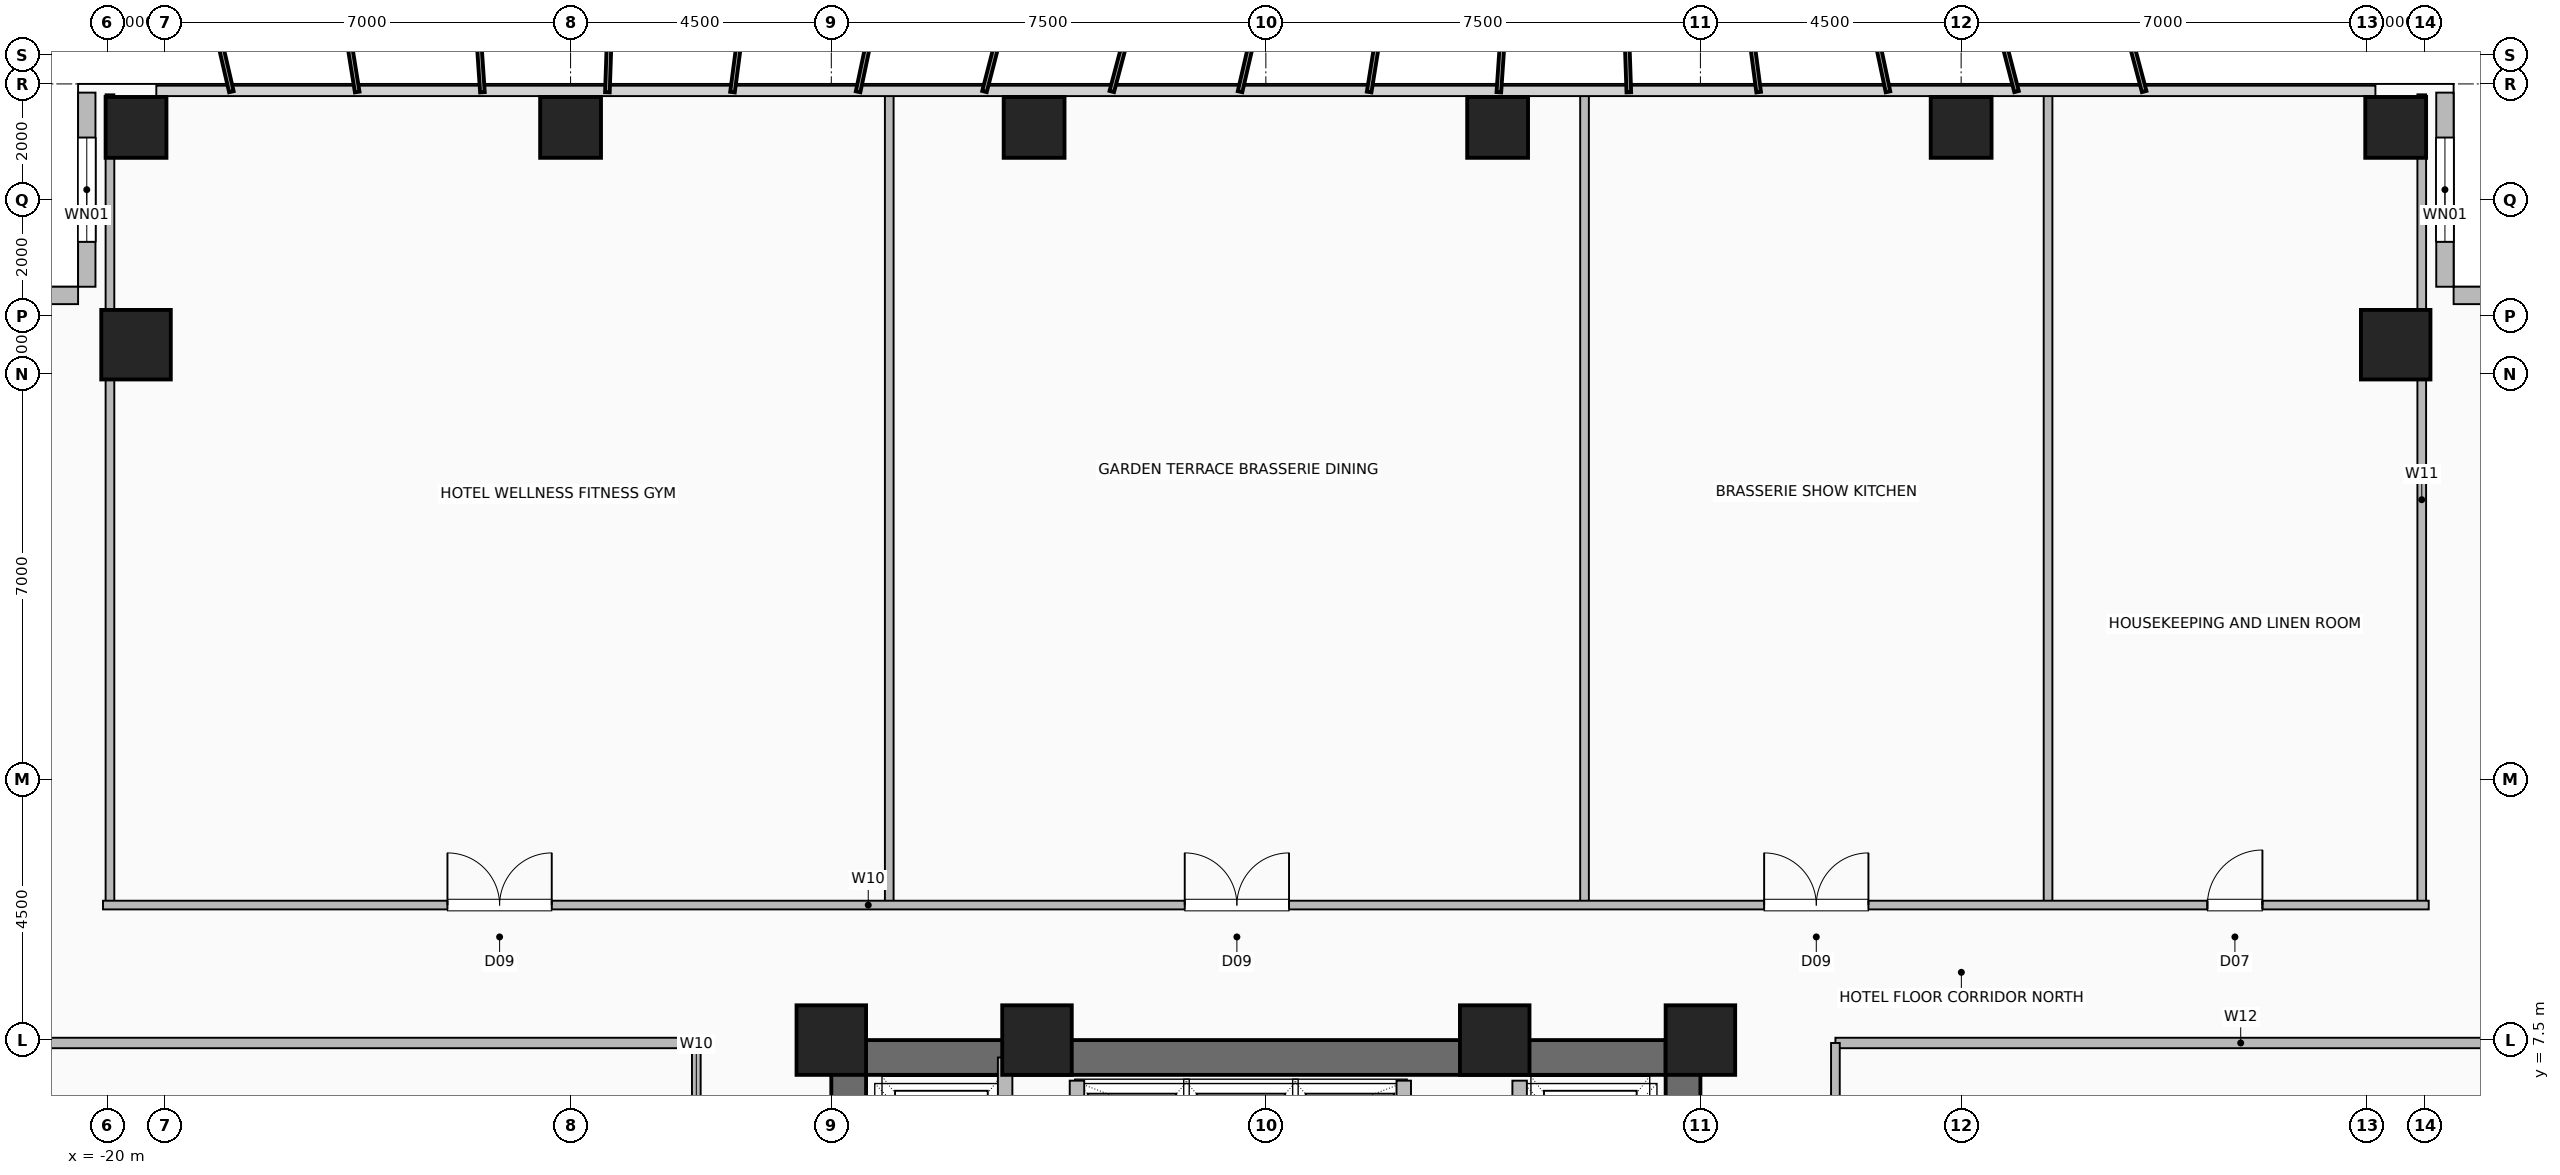
"""IFC4 building model, lengths in metres.
Left out: names, types, materials, properties, quantities, classifications, styles, units other than length and angle.
Written with IfcOpenShell. Run it as: python <this file> out.ifc"""

import sys

from ifc_helpers import new_model, si_unit, direction, frame, frame_2d, origin, origin_2d, place, context, subcontext, project, spatial, rectangle, hollow_rectangle, extrude, element, fill, save


model = new_model("IFC4")
c1 = context("Model", 3, precision=1e-05, world=origin(), true_north=direction((0.0, 1.0)))
c2 = subcontext(c1, "Body", "Model", "MODEL_VIEW")
j1 = project(units=[si_unit("LENGTHUNIT", "METRE"), si_unit("PLANEANGLEUNIT", "RADIAN")], contexts=[c1])
p1 = place(None, origin())
s1 = spatial("IfcSite", under=j1, at=p1, CompositionType="ELEMENT")
p2 = place(p1, origin())
s2 = spatial("IfcBuilding", under=s1, at=p2, CompositionType="ELEMENT")
p3 = place(p2, frame((0.0, 0.0, 48.0)))
s3 = spatial("IfcBuildingStorey", under=s2, at=p3, CompositionType="ELEMENT", Elevation=48.0)
for number, where, z_axis, x_axis in (
    (1, (7.5, 7.5, 0.0), (0.0, 0.0, 1.0), (1.0, 0.0, 0.0)),
    (2, (3.95, 7.5, 0.0), (0.0, 0.0, 1.0), (1.0, 0.0, 0.0)),
    (3, (-3.95, 7.5, 0.0), (0.0, 0.0, 1.0), (1.0, 0.0, 0.0)),
    (4, (-7.5, 7.5, 0.0), (0.0, 0.0, 1.0), (1.0, 0.0, 0.0)),
):
    element("IfcColumn", number, at=place(p3, frame(where, z_axis=z_axis, x_axis=x_axis)), inside=s3, PredefinedType="COLUMN", context=c2, shape_type="SweptSolid", body=[
        extrude(hollow_rectangle(XDim=1.2, YDim=1.2, WallThickness=0.055, at=origin_2d()), origin(), (0.0, 0.0, 1.0), 3.5),
    ])
for number, where, z_axis, x_axis in (
    (5, (-19.5, 23.25, 0.0), (0.0, 0.0, 1.0), (1.0, 0.0, 0.0)),
    (6, (-12.0, 23.25, 0.0), (0.0, 0.0, 1.0), (1.0, 0.0, 0.0)),
    (7, (-4.0, 23.25, 0.0), (0.0, 0.0, 1.0), (1.0, 0.0, 0.0)),
    (8, (4.0, 23.25, 0.0), (0.0, 0.0, 1.0), (1.0, 0.0, 0.0)),
    (9, (12.0, 23.25, 0.0), (0.0, 0.0, 1.0), (1.0, 0.0, 0.0)),
    (10, (19.5, 23.25, 0.0), (0.0, 0.0, 1.0), (1.0, 0.0, 0.0)),
):
    element("IfcColumn", number, at=place(p3, frame(where, z_axis=z_axis, x_axis=x_axis)), inside=s3, PredefinedType="COLUMN", context=c2, shape_type="SweptSolid", body=[
        extrude(hollow_rectangle(XDim=1.05, YDim=1.05, WallThickness=0.05, at=origin_2d()), origin(), (0.0, 0.0, 1.0), 3.5),
    ])
for number, where, z_axis, x_axis in (
    (11, (19.5, 19.5, 0.0), (0.0, 0.0, 1.0), (1.0, 0.0, 0.0)),
    (12, (-19.5, 19.5, 0.0), (0.0, 0.0, 1.0), (1.0, 0.0, 0.0)),
):
    element("IfcColumn", number, at=place(p3, frame(where, z_axis=z_axis, x_axis=x_axis)), inside=s3, PredefinedType="COLUMN", context=c2, shape_type="SweptSolid", body=[
        extrude(hollow_rectangle(XDim=1.2, YDim=1.2, WallThickness=0.055, at=origin_2d()), origin(), (0.0, 0.0, 1.0), 3.5),
    ])
p4 = place(p3, frame((20.35, 23.85, 0.0), z_axis=(0.0, 0.0, 1.0), x_axis=(0.0, -1.0, 0.0)))
e13 = element("IfcWall", 13, at=p4, inside=s3, PredefinedType="SOLIDWALL", context=c2, shape_type="SweptSolid", body=[
    extrude(rectangle(XDim=3.35, YDim=0.3, at=frame_2d((1.675, 0.0))), origin(), (0.0, 0.0, 1.0), 3.25),
])
p5 = place(p4, frame((0.775, 0.0, 0.9)))
e14 = element("IfcOpeningElement", 14, at=p5, cuts=e13, PredefinedType="OPENING", context=c2, shape_type="SweptSolid", body=[
    extrude(rectangle(XDim=1.8, YDim=1.8, at=frame_2d((0.9, 0.9))), frame((0.0, 0.16, 0.0), z_axis=(0.0, -1.0, 0.0), x_axis=(1.0, 0.0, 0.0)), (0.0, 0.0, 1.0), 0.32),
])
p6 = place(p3, frame((23.85, 20.35, 0.0), z_axis=(0.0, 0.0, 1.0), x_axis=(-1.0, 0.0, 0.0)))
e15 = element("IfcWall", 15, at=p6, inside=s3, PredefinedType="SOLIDWALL", context=c2, shape_type="SweptSolid", body=[
    extrude(rectangle(XDim=3.35, YDim=0.3, at=frame_2d((1.675, 0.0))), origin(), (0.0, 0.0, 1.0), 3.25),
])
p7 = place(p3, frame((-20.35, 23.85, 0.0), z_axis=(0.0, 0.0, 1.0), x_axis=(0.0, -1.0, 0.0)))
e16 = element("IfcWall", 16, at=p7, inside=s3, PredefinedType="SOLIDWALL", context=c2, shape_type="SweptSolid", body=[
    extrude(rectangle(XDim=3.35, YDim=0.3, at=frame_2d((1.675, 0.0))), origin(), (0.0, 0.0, 1.0), 3.25),
])
p8 = place(p7, frame((0.775, 0.0, 0.9)))
e17 = element("IfcOpeningElement", 17, at=p8, cuts=e16, PredefinedType="OPENING", context=c2, shape_type="SweptSolid", body=[
    extrude(rectangle(XDim=1.8, YDim=1.8, at=frame_2d((0.9, 0.9))), frame((0.0, 0.16, 0.0), z_axis=(0.0, -1.0, 0.0), x_axis=(1.0, 0.0, 0.0)), (0.0, 0.0, 1.0), 0.32),
])
p9 = place(p3, frame((-23.85, 20.35, 0.0), z_axis=(0.0, 0.0, 1.0), x_axis=(1.0, 0.0, 0.0)))
e18 = element("IfcWall", 18, at=p9, inside=s3, PredefinedType="SOLIDWALL", context=c2, shape_type="SweptSolid", body=[
    extrude(rectangle(XDim=3.35, YDim=0.3, at=frame_2d((1.675, 0.0))), origin(), (0.0, 0.0, 1.0), 3.25),
])
p10 = place(p3, frame((-7.5, 7.2, 0.0), z_axis=(0.0, 0.0, 1.0), x_axis=(1.0, 0.0, 0.0)))
e19 = element("IfcWall", 19, at=p10, inside=s3, PredefinedType="SHEAR", context=c2, shape_type="SweptSolid", body=[
    extrude(rectangle(XDim=15.0, YDim=0.6, at=frame_2d((7.5, 0.0))), origin(), (0.0, 0.0, 1.0), 3.25),
])
p11 = place(p3, frame((-7.2, -7.5, 0.0), z_axis=(0.0, 0.0, 1.0), x_axis=(0.0, 1.0, 0.0)))
e20 = element("IfcWall", 20, at=p11, inside=s3, PredefinedType="SHEAR", context=c2, shape_type="SweptSolid", body=[
    extrude(rectangle(XDim=15.0, YDim=0.6, at=frame_2d((7.5, 0.0))), origin(), (0.0, 0.0, 1.0), 3.25),
])
p12 = place(p11, frame((9.5, 0.0, 0.0)))
e21 = element("IfcOpeningElement", 21, at=p12, cuts=e20, PredefinedType="OPENING", context=c2, shape_type="SweptSolid", body=[
    extrude(rectangle(XDim=1.0, YDim=2.08, at=frame_2d((0.5, 1.04))), frame((0.0, 0.31, 0.0), z_axis=(0.0, -1.0, 0.0), x_axis=(1.0, 0.0, 0.0)), (0.0, 0.0, 1.0), 0.62),
])
p13 = place(p3, frame((7.2, -7.5, 0.0), z_axis=(0.0, 0.0, 1.0), x_axis=(0.0, 1.0, 0.0)))
e22 = element("IfcWall", 22, at=p13, inside=s3, PredefinedType="SHEAR", context=c2, shape_type="SweptSolid", body=[
    extrude(rectangle(XDim=15.0, YDim=0.6, at=frame_2d((7.5, 0.0))), origin(), (0.0, 0.0, 1.0), 3.25),
])
for number, where, z_axis, x_axis in (
    (23, (-3.26, 4.58, 0.0), (0.0, 0.0, 1.0), (0.0, 1.0, 0.0)),
    (24, (2.38, 4.58, 0.0), (0.0, 0.0, 1.0), (0.0, 1.0, 0.0)),
):
    element("IfcWall", number, at=place(p3, frame(where, z_axis=z_axis, x_axis=x_axis)), inside=s3, PredefinedType="SHEAR", context=c2, shape_type="SweptSolid", body=[
        extrude(rectangle(XDim=2.22, YDim=0.25, at=frame_2d((1.11, 0.0))), origin(), (0.0, 0.0, 1.0), 3.25),
    ])
p14 = place(p3, frame((-4.5, 4.35, 0.0), z_axis=(0.0, 0.0, 1.0), x_axis=(0.0, 1.0, 0.0)))
e25 = element("IfcWall", 25, at=p14, inside=s3, PredefinedType="SHEAR", context=c2, shape_type="SweptSolid", body=[
    extrude(rectangle(XDim=2.85, YDim=0.25, at=frame_2d((1.425, 0.0))), origin(), (0.0, 0.0, 1.0), 3.25),
])
p15 = place(p3, frame((4.38, 4.3, 0.0), z_axis=(0.0, 0.0, 1.0), x_axis=(0.0, 1.0, 0.0)))
e26 = element("IfcWall", 26, at=p15, inside=s3, PredefinedType="SHEAR", context=c2, shape_type="SweptSolid", body=[
    extrude(rectangle(XDim=2.5, YDim=0.25, at=frame_2d((1.25, 0.0))), origin(), (0.0, 0.0, 1.0), 3.25),
])
p16 = place(p15, frame((0.8, 0.0, 0.0)))
e27 = element("IfcOpeningElement", 27, at=p16, cuts=e26, PredefinedType="OPENING", context=c2, shape_type="SweptSolid", body=[
    extrude(rectangle(XDim=1.2, YDim=2.2, at=frame_2d((0.6, 1.1))), frame((0.0, 0.135, 0.0), z_axis=(0.0, -1.0, 0.0), x_axis=(1.0, 0.0, 0.0)), (0.0, 0.0, 1.0), 0.27),
])
for number, where, z_axis, x_axis in (
    (28, (-19.95, 9.83, 0.0), (0.0, 0.0, 1.0), (0.0, 1.0, 0.0)),
    (29, (-6.5, 9.83, 0.0), (0.0, 0.0, 1.0), (0.0, 1.0, 0.0)),
    (30, (5.5, 9.83, 0.0), (0.0, 0.0, 1.0), (0.0, 1.0, 0.0)),
    (31, (13.5, 9.83, 0.0), (0.0, 0.0, 1.0), (0.0, 1.0, 0.0)),
    (32, (19.95, 9.83, 0.0), (0.0, 0.0, 1.0), (0.0, 1.0, 0.0)),
):
    element("IfcWall", number, at=place(p3, frame(where, z_axis=z_axis, x_axis=x_axis)), inside=s3, PredefinedType="PARTITIONING", context=c2, shape_type="SweptSolid", body=[
        extrude(rectangle(XDim=13.99, YDim=0.15, at=frame_2d((6.995, 0.0))), origin(), (0.0, 0.0, 1.0), 3.25),
    ])
p17 = place(p3, frame((-20.07, 9.83, 0.0), z_axis=(0.0, 0.0, 1.0), x_axis=(1.0, 0.0, 0.0)))
e33 = element("IfcWall", 33, at=p17, inside=s3, PredefinedType="PARTITIONING", context=c2, shape_type="SweptSolid", body=[
    extrude(rectangle(XDim=40.14, YDim=0.15, at=frame_2d((20.07, 0.0))), origin(), (0.0, 0.0, 1.0), 3.25),
])
p18 = place(p17, frame((5.945, 0.0, 0.0)))
e34 = element("IfcOpeningElement", 34, at=p18, cuts=e33, PredefinedType="OPENING", context=c2, shape_type="SweptSolid", body=[
    extrude(rectangle(XDim=1.8, YDim=2.08, at=frame_2d((0.9, 1.04))), frame((0.0, 0.085, 0.0), z_axis=(0.0, -1.0, 0.0), x_axis=(1.0, 0.0, 0.0)), (0.0, 0.0, 1.0), 0.17),
])
p19 = place(p17, frame((18.67, 0.0, 0.0)))
e35 = element("IfcOpeningElement", 35, at=p19, cuts=e33, PredefinedType="OPENING", context=c2, shape_type="SweptSolid", body=[
    extrude(rectangle(XDim=1.8, YDim=2.08, at=frame_2d((0.9, 1.04))), frame((0.0, 0.085, 0.0), z_axis=(0.0, -1.0, 0.0), x_axis=(1.0, 0.0, 0.0)), (0.0, 0.0, 1.0), 0.17),
])
p20 = place(p17, frame((28.67, 0.0, 0.0)))
e36 = element("IfcOpeningElement", 36, at=p20, cuts=e33, PredefinedType="OPENING", context=c2, shape_type="SweptSolid", body=[
    extrude(rectangle(XDim=1.8, YDim=2.08, at=frame_2d((0.9, 1.04))), frame((0.0, 0.085, 0.0), z_axis=(0.0, -1.0, 0.0), x_axis=(1.0, 0.0, 0.0)), (0.0, 0.0, 1.0), 0.17),
])
p21 = place(p17, frame((36.32, 0.0, 0.0)))
e37 = element("IfcOpeningElement", 37, at=p21, cuts=e33, PredefinedType="OPENING", context=c2, shape_type="SweptSolid", body=[
    extrude(rectangle(XDim=0.95, YDim=2.06, at=frame_2d((0.475, 1.03))), frame((0.0, 0.085, 0.0), z_axis=(0.0, -1.0, 0.0), x_axis=(1.0, 0.0, 0.0)), (0.0, 0.0, 1.0), 0.17),
])
p22 = place(p3, frame((-23.82, 7.45, 0.0), z_axis=(0.0, 0.0, 1.0), x_axis=(1.0, 0.0, 0.0)))
e38 = element("IfcWall", 38, at=p22, inside=s3, PredefinedType="PARTITIONING", context=c2, shape_type="SweptSolid", body=[
    extrude(rectangle(XDim=13.99, YDim=0.18, at=frame_2d((6.995, 0.0))), origin(), (0.0, 0.0, 1.0), 3.25),
])
p23 = place(p3, frame((-9.83, -7.45, 0.0), z_axis=(0.0, 0.0, 1.0), x_axis=(0.0, 1.0, 0.0)))
e39 = element("IfcWall", 39, at=p23, inside=s3, PredefinedType="PARTITIONING", context=c2, shape_type="SweptSolid", body=[
    extrude(rectangle(XDim=14.9, YDim=0.15, at=frame_2d((7.45, 0.0))), origin(), (0.0, 0.0, 1.0), 3.25),
])
p24 = place(p23, frame((3.049, 0.0, 0.0)))
e40 = element("IfcOpeningElement", 40, at=p24, cuts=e39, PredefinedType="OPENING", context=c2, shape_type="SweptSolid", body=[
    extrude(rectangle(XDim=0.95, YDim=2.08, at=frame_2d((0.475, 1.04))), frame((0.0, 0.085, 0.0), z_axis=(0.0, -1.0, 0.0), x_axis=(1.0, 0.0, 0.0)), (0.0, 0.0, 1.0), 0.17),
])
p25 = place(p23, frame((7.927, 0.0, 0.0)))
e41 = element("IfcOpeningElement", 41, at=p25, cuts=e39, PredefinedType="OPENING", context=c2, shape_type="SweptSolid", body=[
    extrude(rectangle(XDim=0.95, YDim=2.08, at=frame_2d((0.475, 1.04))), frame((0.0, 0.085, 0.0), z_axis=(0.0, -1.0, 0.0), x_axis=(1.0, 0.0, 0.0)), (0.0, 0.0, 1.0), 0.17),
])
p26 = place(p23, frame((12.899, 0.0, 0.0)))
e42 = element("IfcOpeningElement", 42, at=p26, cuts=e39, PredefinedType="OPENING", context=c2, shape_type="SweptSolid", body=[
    extrude(rectangle(XDim=0.95, YDim=2.08, at=frame_2d((0.475, 1.04))), frame((0.0, 0.085, 0.0), z_axis=(0.0, -1.0, 0.0), x_axis=(1.0, 0.0, 0.0)), (0.0, 0.0, 1.0), 0.17),
])
p27 = place(p3, frame((9.83, 7.45, 0.0), z_axis=(0.0, 0.0, 1.0), x_axis=(1.0, 0.0, 0.0)))
e43 = element("IfcWall", 43, at=p27, inside=s3, PredefinedType="PARTITIONING", context=c2, shape_type="SweptSolid", body=[
    extrude(rectangle(XDim=13.99, YDim=0.18, at=frame_2d((6.995, 0.0))), origin(), (0.0, 0.0, 1.0), 3.25),
])
p28 = place(p3, frame((9.83, -7.45, 0.0), z_axis=(0.0, 0.0, 1.0), x_axis=(0.0, 1.0, 0.0)))
e44 = element("IfcWall", 44, at=p28, inside=s3, PredefinedType="PARTITIONING", context=c2, shape_type="SweptSolid", body=[
    extrude(rectangle(XDim=14.9, YDim=0.15, at=frame_2d((7.45, 0.0))), origin(), (0.0, 0.0, 1.0), 3.25),
])
p29 = place(p28, frame((3.049, 0.0, 0.0)))
e45 = element("IfcOpeningElement", 45, at=p29, cuts=e44, PredefinedType="OPENING", context=c2, shape_type="SweptSolid", body=[
    extrude(rectangle(XDim=0.95, YDim=2.08, at=frame_2d((0.475, 1.04))), frame((0.0, 0.085, 0.0), z_axis=(0.0, -1.0, 0.0), x_axis=(1.0, 0.0, 0.0)), (0.0, 0.0, 1.0), 0.17),
])
p30 = place(p28, frame((7.927, 0.0, 0.0)))
e46 = element("IfcOpeningElement", 46, at=p30, cuts=e44, PredefinedType="OPENING", context=c2, shape_type="SweptSolid", body=[
    extrude(rectangle(XDim=0.95, YDim=2.08, at=frame_2d((0.475, 1.04))), frame((0.0, 0.085, 0.0), z_axis=(0.0, -1.0, 0.0), x_axis=(1.0, 0.0, 0.0)), (0.0, 0.0, 1.0), 0.17),
])
p31 = place(p28, frame((12.899, 0.0, 0.0)))
e47 = element("IfcOpeningElement", 47, at=p31, cuts=e44, PredefinedType="OPENING", context=c2, shape_type="SweptSolid", body=[
    extrude(rectangle(XDim=0.95, YDim=2.08, at=frame_2d((0.475, 1.04))), frame((0.0, 0.085, 0.0), z_axis=(0.0, -1.0, 0.0), x_axis=(1.0, 0.0, 0.0)), (0.0, 0.0, 1.0), 0.17),
])
p32 = place(p5, origin())
e48 = element("IfcWindow", 48, at=p32, inside=s3, PartitioningType="SINGLE_PANEL", PredefinedType="WINDOW", context=c2, shape_type="SweptSolid", body=[
    extrude(rectangle(XDim=1.8, YDim=1.8, at=frame_2d((0.9, 0.9))), frame((0.0, 0.03, 0.0), z_axis=(0.0, -1.0, 0.0), x_axis=(1.0, 0.0, 0.0)), (0.0, 0.0, 1.0), 0.06),
])
fill(e14, e48)
p33 = place(p8, origin())
e49 = element("IfcWindow", 49, at=p33, inside=s3, PartitioningType="SINGLE_PANEL", PredefinedType="WINDOW", context=c2, shape_type="SweptSolid", body=[
    extrude(rectangle(XDim=1.8, YDim=1.8, at=frame_2d((0.9, 0.9))), frame((0.0, 0.03, 0.0), z_axis=(0.0, -1.0, 0.0), x_axis=(1.0, 0.0, 0.0)), (0.0, 0.0, 1.0), 0.06),
])
fill(e17, e49)
p34 = place(p18, origin())
e50 = element("IfcDoor", 50, at=p34, inside=s3, OperationType="DOUBLE_DOOR_SINGLE_SWING", PredefinedType="DOOR", context=c2, shape_type="SweptSolid", body=[
    extrude(rectangle(XDim=1.8, YDim=2.08, at=frame_2d((0.9, 1.04))), frame((0.0, 0.025, 0.0), z_axis=(0.0, -1.0, 0.0), x_axis=(1.0, 0.0, 0.0)), (0.0, 0.0, 1.0), 0.05),
])
fill(e34, e50)
p35 = place(p19, origin())
e51 = element("IfcDoor", 51, at=p35, inside=s3, OperationType="DOUBLE_DOOR_SINGLE_SWING", PredefinedType="DOOR", context=c2, shape_type="SweptSolid", body=[
    extrude(rectangle(XDim=1.8, YDim=2.08, at=frame_2d((0.9, 1.04))), frame((0.0, 0.025, 0.0), z_axis=(0.0, -1.0, 0.0), x_axis=(1.0, 0.0, 0.0)), (0.0, 0.0, 1.0), 0.05),
])
fill(e35, e51)
p36 = place(p20, origin())
e52 = element("IfcDoor", 52, at=p36, inside=s3, OperationType="DOUBLE_DOOR_SINGLE_SWING", PredefinedType="DOOR", context=c2, shape_type="SweptSolid", body=[
    extrude(rectangle(XDim=1.8, YDim=2.08, at=frame_2d((0.9, 1.04))), frame((0.0, 0.025, 0.0), z_axis=(0.0, -1.0, 0.0), x_axis=(1.0, 0.0, 0.0)), (0.0, 0.0, 1.0), 0.05),
])
fill(e36, e52)
p37 = place(p21, origin())
e53 = element("IfcDoor", 53, at=p37, inside=s3, OperationType="SINGLE_SWING_RIGHT", PredefinedType="DOOR", context=c2, shape_type="SweptSolid", body=[
    extrude(rectangle(XDim=0.95, YDim=2.06, at=frame_2d((0.475, 1.03))), frame((0.0, 0.025, 0.0), z_axis=(0.0, -1.0, 0.0), x_axis=(1.0, 0.0, 0.0)), (0.0, 0.0, 1.0), 0.05),
])
fill(e37, e53)
save(model, sys.argv[1])
